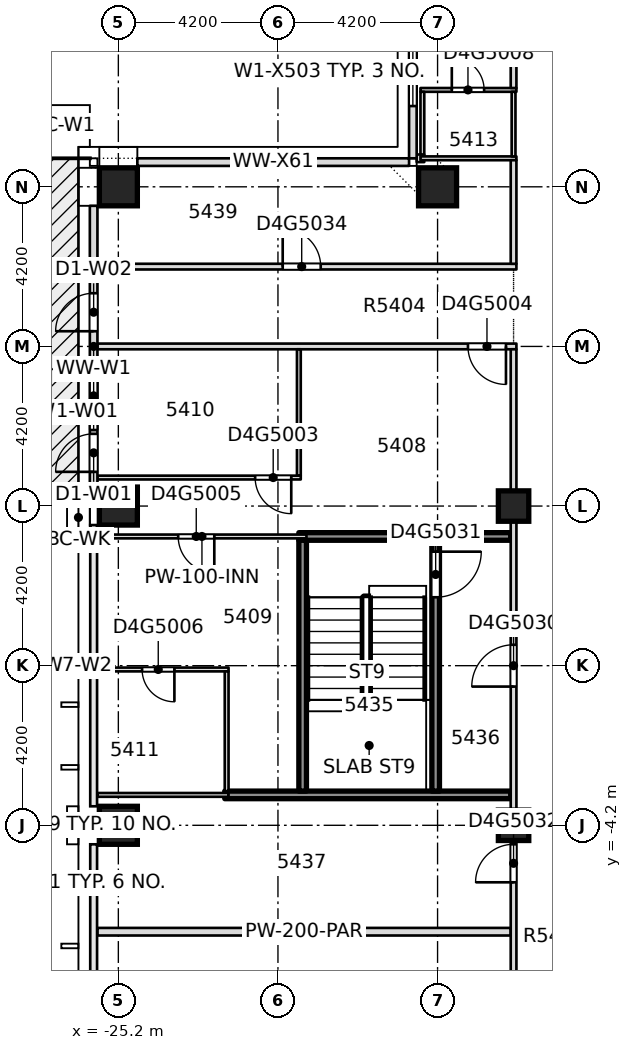
"""IFC4 building model, lengths in metres.
Left out: names, types, materials, properties, quantities, classifications, styles, units other than length and angle.
Written with IfcOpenShell. Run it as: python <this file> out.ifc"""

import sys

from ifc_helpers import new_model, si_unit, direction, frame, frame_2d, origin, origin_2d, place, context, subcontext, project, spatial, rectangle, extrude, element, fill, save


model = new_model("IFC4")
c1 = context("Model", 3, precision=1e-05, world=origin(), true_north=direction((0.0, 1.0)))
c2 = subcontext(c1, "Body", "Model", "MODEL_VIEW")
j1 = project(units=[si_unit("LENGTHUNIT", "METRE"), si_unit("PLANEANGLEUNIT", "RADIAN")], contexts=[c1])
p1 = place(None, origin())
s1 = spatial("IfcSite", under=j1, at=p1, CompositionType="ELEMENT")
p2 = place(p1, origin())
s2 = spatial("IfcBuilding", under=s1, at=p2, CompositionType="ELEMENT")
p3 = place(p2, frame((0.0, 0.0, 206.6)))
s3 = spatial("IfcBuildingStorey", under=s2, at=p3, CompositionType="ELEMENT", Elevation=206.6)
for number, where, z_axis, x_axis in (
    (1, (-25.2, -4.2, -0.4), (0.0, 0.0, 1.0), (1.0, 0.0, 0.0)),
    (2, (-25.2, 4.2, -0.4), (0.0, 0.0, 1.0), (1.0, 0.0, 0.0)),
    (3, (-25.2, 12.6, -0.4), (0.0, 0.0, 1.0), (1.0, 0.0, 0.0)),
    (4, (-16.8, 12.6, -0.4), (0.0, 0.0, 1.0), (1.0, 0.0, 0.0)),
):
    element("IfcColumn", number, at=place(p3, frame(where, z_axis=z_axis, x_axis=x_axis)), inside=s3, PredefinedType="COLUMN", context=c2, shape_type="SweptSolid", body=[
        extrude(rectangle(XDim=1.0, YDim=1.0, at=origin_2d()), origin(), (0.0, 0.0, 1.0), 3.45),
    ])
for number, where, z_axis, x_axis in (
    (5, (-14.8, -4.2, -0.4), (0.0, 0.0, 1.0), (1.0, 0.0, 0.0)),
    (6, (-14.8, 4.2, -0.4), (0.0, 0.0, 1.0), (1.0, 0.0, 0.0)),
):
    element("IfcColumn", number, at=place(p3, frame(where, z_axis=z_axis, x_axis=x_axis)), inside=s3, PredefinedType="COLUMN", context=c2, shape_type="SweptSolid", body=[
        extrude(rectangle(XDim=0.8, YDim=0.8, at=origin_2d()), origin(), (0.0, 0.0, 1.0), 3.45),
    ])
p4 = place(p3, frame((-25.75, -7.0, 0.0), z_axis=(0.0, 0.0, 1.0), x_axis=(1.0, 0.0, 0.0)))
e7 = element("IfcWall", 7, at=p4, inside=s3, PredefinedType="PARTITIONING", context=c2, shape_type="SweptSolid", body=[
    extrude(rectangle(XDim=10.875, YDim=0.2, at=frame_2d((5.438, 0.0))), origin(), (0.0, 0.0, 1.0), 3.05),
])
p5 = place(p3, frame((-25.75, -3.4, 0.0), z_axis=(0.0, 0.0, 1.0), x_axis=(1.0, 0.0, 0.0)))
e8 = element("IfcWall", 8, at=p5, inside=s3, PredefinedType="PARTITIONING", context=c2, shape_type="SweptSolid", body=[
    extrude(rectangle(XDim=3.45, YDim=0.1, at=frame_2d((1.725, 0.0))), origin(), (0.0, 0.0, 1.0), 3.05),
])
p6 = place(p3, frame((-22.4, -3.4, 0.0), z_axis=(0.0, 0.0, 1.0), x_axis=(1.0, 0.0, 0.0)))
e9 = element("IfcWall", 9, at=p6, inside=s3, PredefinedType="SOLIDWALL", context=c2, shape_type="SweptSolid", body=[
    extrude(rectangle(XDim=7.525, YDim=0.2, at=frame_2d((3.762, 0.0))), origin(), (0.0, 0.0, 1.0), 3.05),
])
p7 = place(p3, frame((-25.75, -0.1, 0.0), z_axis=(0.0, 0.0, 1.0), x_axis=(1.0, 0.0, 0.0)))
e10 = element("IfcWall", 10, at=p7, inside=s3, PredefinedType="PARTITIONING", context=c2, shape_type="SweptSolid", body=[
    extrude(rectangle(XDim=3.45, YDim=0.1, at=frame_2d((1.725, 0.0))), origin(), (0.0, 0.0, 1.0), 3.05),
])
p8 = place(p7, frame((1.175, 0.0, 0.0)))
e11 = element("IfcOpeningElement", 11, at=p8, cuts=e10, PredefinedType="OPENING", context=c2, shape_type="SweptSolid", body=[
    extrude(rectangle(XDim=0.85, YDim=2.1, at=frame_2d((0.425, 1.05))), frame((0.0, 0.06, 0.0), z_axis=(0.0, -1.0, 0.0), x_axis=(1.0, 0.0, 0.0)), (0.0, 0.0, 1.0), 0.12),
])
p9 = place(p3, frame((-25.75, 3.4, 0.0), z_axis=(0.0, 0.0, 1.0), x_axis=(1.0, 0.0, 0.0)))
e12 = element("IfcWall", 12, at=p9, inside=s3, PredefinedType="PARTITIONING", context=c2, shape_type="SweptSolid", body=[
    extrude(rectangle(XDim=5.5, YDim=0.1, at=frame_2d((2.75, 0.0))), origin(), (0.0, 0.0, 1.0), 3.05),
])
p10 = place(p9, frame((2.125, 0.0, 0.0)))
e13 = element("IfcOpeningElement", 13, at=p10, cuts=e12, PredefinedType="OPENING", context=c2, shape_type="SweptSolid", body=[
    extrude(rectangle(XDim=0.95, YDim=2.1, at=frame_2d((0.475, 1.05))), frame((0.0, 0.06, 0.0), z_axis=(0.0, -1.0, 0.0), x_axis=(1.0, 0.0, 0.0)), (0.0, 0.0, 1.0), 0.12),
])
p11 = place(p3, frame((-20.45, 3.4, 0.0), z_axis=(0.0, 0.0, 1.0), x_axis=(1.0, 0.0, 0.0)))
e14 = element("IfcWall", 14, at=p11, inside=s3, PredefinedType="SOLIDWALL", context=c2, shape_type="SweptSolid", body=[
    extrude(rectangle(XDim=5.575, YDim=0.2, at=frame_2d((2.788, 0.0))), origin(), (0.0, 0.0, 1.0), 3.05),
])
p12 = place(p3, frame((-25.75, 4.95, 0.0), z_axis=(0.0, 0.0, 1.0), x_axis=(1.0, 0.0, 0.0)))
e15 = element("IfcWall", 15, at=p12, inside=s3, PredefinedType="PARTITIONING", context=c2, shape_type="SweptSolid", body=[
    extrude(rectangle(XDim=5.35, YDim=0.1, at=frame_2d((2.675, 0.0))), origin(), (0.0, 0.0, 1.0), 3.05),
])
p13 = place(p12, frame((4.15, 0.0, 0.0)))
e16 = element("IfcOpeningElement", 16, at=p13, cuts=e15, PredefinedType="OPENING", context=c2, shape_type="SweptSolid", body=[
    extrude(rectangle(XDim=0.95, YDim=2.1, at=frame_2d((0.475, 1.05))), frame((0.0, 0.06, 0.0), z_axis=(0.0, -1.0, 0.0), x_axis=(1.0, 0.0, 0.0)), (0.0, 0.0, 1.0), 0.12),
])
p14 = place(p3, frame((-25.75, 8.4, 0.0), z_axis=(0.0, 0.0, 1.0), x_axis=(1.0, 0.0, 0.0)))
e17 = element("IfcWall", 17, at=p14, inside=s3, PredefinedType="PARTITIONING", context=c2, shape_type="SweptSolid", body=[
    extrude(rectangle(XDim=11.025, YDim=0.15, at=frame_2d((5.512, 0.0))), origin(), (0.0, 0.0, 1.0), 3.05),
])
p15 = place(p14, frame((9.75, 0.0, 0.0)))
e18 = element("IfcOpeningElement", 18, at=p15, cuts=e17, PredefinedType="OPENING", context=c2, shape_type="SweptSolid", body=[
    extrude(rectangle(XDim=1.0, YDim=2.1, at=frame_2d((0.5, 1.05))), frame((0.0, 0.085, 0.0), z_axis=(0.0, -1.0, 0.0), x_axis=(1.0, 0.0, 0.0)), (0.0, 0.0, 1.0), 0.17),
])
p16 = place(p3, frame((-25.75, 10.5, 0.0), z_axis=(0.0, 0.0, 1.0), x_axis=(1.0, 0.0, 0.0)))
e19 = element("IfcWall", 19, at=p16, inside=s3, PredefinedType="PARTITIONING", context=c2, shape_type="SweptSolid", body=[
    extrude(rectangle(XDim=11.025, YDim=0.15, at=frame_2d((5.512, 0.0))), origin(), (0.0, 0.0, 1.0), 3.05),
])
p17 = place(p16, frame((4.875, 0.0, 0.0)))
e20 = element("IfcOpeningElement", 20, at=p17, cuts=e19, PredefinedType="OPENING", context=c2, shape_type="SweptSolid", body=[
    extrude(rectangle(XDim=1.0, YDim=2.1, at=frame_2d((0.5, 1.05))), frame((0.0, 0.085, 0.0), z_axis=(0.0, -1.0, 0.0), x_axis=(1.0, 0.0, 0.0)), (0.0, 0.0, 1.0), 0.17),
])
p18 = place(p3, frame((-17.35, 13.35, 0.0), z_axis=(0.0, 0.0, 1.0), x_axis=(1.0, 0.0, 0.0)))
e21 = element("IfcWall", 21, at=p18, inside=s3, PredefinedType="PARTITIONING", context=c2, shape_type="SweptSolid", body=[
    extrude(rectangle(XDim=0.2, YDim=0.2, at=frame_2d((0.1, 0.0))), origin(), (0.0, 0.0, 1.0), 3.05),
])
p19 = place(p3, frame((-17.25, 13.35, 0.0), z_axis=(0.0, 0.0, 1.0), x_axis=(1.0, 0.0, 0.0)))
e22 = element("IfcWall", 22, at=p19, inside=s3, PredefinedType="PARTITIONING", context=c2, shape_type="SweptSolid", body=[
    extrude(rectangle(XDim=2.525, YDim=0.1, at=frame_2d((1.262, 0.0))), origin(), (0.0, 0.0, 1.0), 3.05),
])
p20 = place(p3, frame((-17.25, 15.15, 0.0), z_axis=(0.0, 0.0, 1.0), x_axis=(1.0, 0.0, 0.0)))
e23 = element("IfcWall", 23, at=p20, inside=s3, PredefinedType="PARTITIONING", context=c2, shape_type="SweptSolid", body=[
    extrude(rectangle(XDim=2.525, YDim=0.1, at=frame_2d((1.262, 0.0))), origin(), (0.0, 0.0, 1.0), 3.05),
])
p21 = place(p20, frame((0.825, 0.0, 0.0)))
e24 = element("IfcOpeningElement", 24, at=p21, cuts=e23, PredefinedType="OPENING", context=c2, shape_type="SweptSolid", body=[
    extrude(rectangle(XDim=0.85, YDim=2.1, at=frame_2d((0.425, 1.05))), frame((0.0, 0.06, 0.0), z_axis=(0.0, -1.0, 0.0), x_axis=(1.0, 0.0, 0.0)), (0.0, 0.0, 1.0), 0.12),
])
p22 = place(p3, frame((-22.35, -3.3, 0.0), z_axis=(0.0, 0.0, 1.0), x_axis=(0.0, 1.0, 0.0)))
e25 = element("IfcWall", 25, at=p22, inside=s3, PredefinedType="PARTITIONING", context=c2, shape_type="SweptSolid", body=[
    extrude(rectangle(XDim=3.15, YDim=0.1, at=frame_2d((1.575, 0.0))), origin(), (0.0, 0.0, 1.0), 3.05),
])
p23 = place(p3, frame((-20.45, 5.0, 0.0), z_axis=(0.0, 0.0, 1.0), x_axis=(0.0, 1.0, 0.0)))
e26 = element("IfcWall", 26, at=p23, inside=s3, PredefinedType="PARTITIONING", context=c2, shape_type="SweptSolid", body=[
    extrude(rectangle(XDim=3.325, YDim=0.1, at=frame_2d((1.663, 0.0))), origin(), (0.0, 0.0, 1.0), 3.05),
])
p24 = place(p3, frame((-20.35, -3.3, 0.0), z_axis=(0.0, 0.0, 1.0), x_axis=(0.0, 1.0, 0.0)))
e27 = element("IfcWall", 27, at=p24, inside=s3, PredefinedType="SOLIDWALL", context=c2, shape_type="SweptSolid", body=[
    extrude(rectangle(XDim=6.6, YDim=0.2, at=frame_2d((3.3, 0.0))), origin(), (0.0, 0.0, 1.0), 3.05),
])
p25 = place(p3, frame((-17.2, 13.45, 0.0), z_axis=(0.0, 0.0, 1.0), x_axis=(0.0, 1.0, 0.0)))
e28 = element("IfcWall", 28, at=p25, inside=s3, PredefinedType="PARTITIONING", context=c2, shape_type="SweptSolid", body=[
    extrude(rectangle(XDim=1.65, YDim=0.1, at=frame_2d((0.825, 0.0))), origin(), (0.0, 0.0, 1.0), 3.05),
])
p26 = place(p3, frame((-16.85, -3.3, 0.0), z_axis=(0.0, 0.0, 1.0), x_axis=(0.0, 1.0, 0.0)))
e29 = element("IfcWall", 29, at=p26, inside=s3, PredefinedType="SOLIDWALL", context=c2, shape_type="SweptSolid", body=[
    extrude(rectangle(XDim=6.6, YDim=0.2, at=frame_2d((3.3, 0.0))), origin(), (0.0, 0.0, 1.0), 3.05),
])
p27 = place(p26, frame((5.1, 0.0, 0.0)))
e30 = element("IfcOpeningElement", 30, at=p27, cuts=e29, PredefinedType="OPENING", context=c2, shape_type="SweptSolid", body=[
    extrude(rectangle(XDim=1.2, YDim=2.1, at=frame_2d((0.6, 1.05))), frame((0.0, 0.11, 0.0), z_axis=(0.0, -1.0, 0.0), x_axis=(1.0, 0.0, 0.0)), (0.0, 0.0, 1.0), 0.22),
])
p28 = place(p3, frame((-14.8, -9.77, 0.0), z_axis=(0.0, 0.0, 1.0), x_axis=(0.0, 1.0, 0.0)))
e31 = element("IfcWall", 31, at=p28, inside=s3, PredefinedType="PARTITIONING", context=c2, shape_type="SweptSolid", body=[
    extrude(rectangle(XDim=18.095, YDim=0.15, at=frame_2d((9.047, 0.0))), origin(), (0.0, 0.0, 1.0), 3.05),
])
p29 = place(p28, frame((0.22, 0.0, 0.0)))
e32 = element("IfcOpeningElement", 32, at=p29, cuts=e31, PredefinedType="OPENING", context=c2, shape_type="SweptSolid", body=[
    extrude(rectangle(XDim=0.95, YDim=2.1, at=frame_2d((0.475, 1.05))), frame((0.0, 0.085, 0.0), z_axis=(0.0, -1.0, 0.0), x_axis=(1.0, 0.0, 0.0)), (0.0, 0.0, 1.0), 0.17),
])
p30 = place(p28, frame((9.22, 0.0, 0.0)))
e33 = element("IfcOpeningElement", 33, at=p30, cuts=e31, PredefinedType="OPENING", context=c2, shape_type="SweptSolid", body=[
    extrude(rectangle(XDim=1.1, YDim=2.1, at=frame_2d((0.55, 1.05))), frame((0.0, 0.085, 0.0), z_axis=(0.0, -1.0, 0.0), x_axis=(1.0, 0.0, 0.0)), (0.0, 0.0, 1.0), 0.17),
])
p31 = place(p28, frame((4.07, 0.0, 0.0)))
e34 = element("IfcOpeningElement", 34, at=p31, cuts=e31, PredefinedType="OPENING", context=c2, shape_type="SweptSolid", body=[
    extrude(rectangle(XDim=1.0, YDim=2.1, at=frame_2d((0.5, 1.05))), frame((0.0, 0.085, 0.0), z_axis=(0.0, -1.0, 0.0), x_axis=(1.0, 0.0, 0.0)), (0.0, 0.0, 1.0), 0.17),
])
p32 = place(p3, frame((-14.8, 10.575, 0.0), z_axis=(0.0, 0.0, 1.0), x_axis=(0.0, 1.0, 0.0)))
e35 = element("IfcWall", 35, at=p32, inside=s3, PredefinedType="PARTITIONING", context=c2, shape_type="SweptSolid", body=[
    extrude(rectangle(XDim=2.725, YDim=0.15, at=frame_2d((1.363, 0.0))), origin(), (0.0, 0.0, 1.0), 3.05),
])
p33 = place(p3, frame((-14.8, 13.4, 0.0), z_axis=(0.0, 0.0, 1.0), x_axis=(0.0, 1.0, 0.0)))
e36 = element("IfcWall", 36, at=p33, inside=s3, PredefinedType="PARTITIONING", context=c2, shape_type="SweptSolid", body=[
    extrude(rectangle(XDim=1.7, YDim=0.1, at=frame_2d((0.85, 0.0))), origin(), (0.0, 0.0, 1.0), 3.05),
])
p34 = place(p3, frame((-14.8, 15.2, 0.0), z_axis=(0.0, 0.0, 1.0), x_axis=(0.0, 1.0, 0.0)))
e37 = element("IfcWall", 37, at=p34, inside=s3, PredefinedType="PARTITIONING", context=c2, shape_type="SweptSolid", body=[
    extrude(rectangle(XDim=6.35, YDim=0.15, at=frame_2d((3.175, 0.0))), origin(), (0.0, 0.0, 1.0), 3.05),
])
p35 = place(p34, frame((2.475, 0.0, 0.0)))
e38 = element("IfcOpeningElement", 38, at=p35, cuts=e37, PredefinedType="OPENING", context=c2, shape_type="SweptSolid", body=[
    extrude(rectangle(XDim=0.95, YDim=2.1, at=frame_2d((0.475, 1.05))), frame((0.0, 0.085, 0.0), z_axis=(0.0, -1.0, 0.0), x_axis=(1.0, 0.0, 0.0)), (0.0, 0.0, 1.0), 0.17),
])
p36 = place(p3, frame((-17.45, 20.5, 0.0), z_axis=(0.0, 0.0, 1.0), x_axis=(0.0, -1.0, 0.0)))
e39 = element("IfcWall", 39, at=p36, inside=s3, PredefinedType="STANDARD", context=c2, shape_type="SweptSolid", body=[
    extrude(rectangle(XDim=7.15, YDim=0.2, at=frame_2d((3.575, 0.0))), origin(), (0.0, 0.0, 1.0), 3.05),
])
p37 = place(p36, frame((3.975, 0.0, 0.2)))
e40 = element("IfcOpeningElement", 40, at=p37, cuts=e39, PredefinedType="OPENING", context=c2, shape_type="SweptSolid", body=[
    extrude(rectangle(XDim=1.8, YDim=2.65, at=frame_2d((0.9, 1.325))), frame((0.0, 0.11, 0.0), z_axis=(0.0, -1.0, 0.0), x_axis=(1.0, 0.0, 0.0)), (0.0, 0.0, 1.0), 0.22),
])
p38 = place(p36, frame((0.4, 0.0, 0.2)))
e41 = element("IfcOpeningElement", 41, at=p38, cuts=e39, PredefinedType="OPENING", context=c2, shape_type="SweptSolid", body=[
    extrude(rectangle(XDim=1.8, YDim=2.65, at=frame_2d((0.9, 1.325))), frame((0.0, 0.11, 0.0), z_axis=(0.0, -1.0, 0.0), x_axis=(1.0, 0.0, 0.0)), (0.0, 0.0, 1.0), 0.22),
])
p39 = place(p3, frame((-17.55, 13.25, 0.0), z_axis=(0.0, 0.0, 1.0), x_axis=(-1.0, 0.0, 0.0)))
e42 = element("IfcWall", 42, at=p39, inside=s3, PredefinedType="STANDARD", context=c2, shape_type="SweptSolid", body=[
    extrude(rectangle(XDim=7.15, YDim=0.2, at=frame_2d((3.575, 0.0))), origin(), (0.0, 0.0, 1.0), 3.05),
])
p40 = place(p3, frame((-25.85, 12.1, 0.0), z_axis=(0.0, 0.0, 1.0), x_axis=(0.0, -1.0, 0.0)))
e43 = element("IfcWall", 43, at=p40, inside=s3, PredefinedType="STANDARD", context=c2, shape_type="SweptSolid", body=[
    extrude(rectangle(XDim=7.4, YDim=0.2, at=frame_2d((3.7, 0.0))), origin(), (0.0, 0.0, 1.0), 3.05),
])
p41 = place(p40, frame((4.1, 0.0, 0.2)))
e44 = element("IfcOpeningElement", 44, at=p41, cuts=e43, PredefinedType="OPENING", context=c2, shape_type="SweptSolid", body=[
    extrude(rectangle(XDim=1.8, YDim=2.65, at=frame_2d((0.9, 1.325))), frame((0.0, 0.11, 0.0), z_axis=(0.0, -1.0, 0.0), x_axis=(1.0, 0.0, 0.0)), (0.0, 0.0, 1.0), 0.22),
])
p42 = place(p40, frame((6.0, 0.0, 0.0)))
e45 = element("IfcOpeningElement", 45, at=p42, cuts=e43, PredefinedType="OPENING", context=c2, shape_type="SweptSolid", body=[
    extrude(rectangle(XDim=1.0, YDim=2.4, at=frame_2d((0.5, 1.2))), frame((0.0, 0.11, 0.0), z_axis=(0.0, -1.0, 0.0), x_axis=(1.0, 0.0, 0.0)), (0.0, 0.0, 1.0), 0.22),
])
p43 = place(p40, frame((2.3, 0.0, 0.0)))
e46 = element("IfcOpeningElement", 46, at=p43, cuts=e43, PredefinedType="OPENING", context=c2, shape_type="SweptSolid", body=[
    extrude(rectangle(XDim=1.0, YDim=2.4, at=frame_2d((0.5, 1.2))), frame((0.0, 0.11, 0.0), z_axis=(0.0, -1.0, 0.0), x_axis=(1.0, 0.0, 0.0)), (0.0, 0.0, 1.0), 0.22),
])
p44 = place(p13, origin())
e47 = element("IfcDoor", 47, at=p44, inside=s3, OperationType="SINGLE_SWING_LEFT", PredefinedType="DOOR", context=c2, shape_type="SweptSolid", body=[
    extrude(rectangle(XDim=0.95, YDim=2.1, at=frame_2d((0.475, 1.05))), frame((0.0, 0.025, 0.0), z_axis=(0.0, -1.0, 0.0), x_axis=(1.0, 0.0, 0.0)), (0.0, 0.0, 1.0), 0.05),
])
fill(e16, e47)
p45 = place(p15, origin())
e48 = element("IfcDoor", 48, at=p45, inside=s3, OperationType="SINGLE_SWING_RIGHT", PredefinedType="DOOR", context=c2, shape_type="SweptSolid", body=[
    extrude(rectangle(XDim=1.0, YDim=2.1, at=frame_2d((0.5, 1.05))), frame((0.0, 0.025, 0.0), z_axis=(0.0, -1.0, 0.0), x_axis=(1.0, 0.0, 0.0)), (0.0, 0.0, 1.0), 0.05),
])
fill(e18, e48)
p46 = place(p10, origin())
e49 = element("IfcDoor", 49, at=p46, inside=s3, OperationType="SINGLE_SWING_LEFT", PredefinedType="DOOR", context=c2, shape_type="SweptSolid", body=[
    extrude(rectangle(XDim=0.95, YDim=2.1, at=frame_2d((0.475, 1.05))), frame((0.0, 0.025, 0.0), z_axis=(0.0, -1.0, 0.0), x_axis=(1.0, 0.0, 0.0)), (0.0, 0.0, 1.0), 0.05),
])
fill(e13, e49)
p47 = place(p8, origin())
e50 = element("IfcDoor", 50, at=p47, inside=s3, OperationType="SINGLE_SWING_RIGHT", PredefinedType="DOOR", context=c2, shape_type="SweptSolid", body=[
    extrude(rectangle(XDim=0.85, YDim=2.1, at=frame_2d((0.425, 1.05))), frame((0.0, 0.025, 0.0), z_axis=(0.0, -1.0, 0.0), x_axis=(1.0, 0.0, 0.0)), (0.0, 0.0, 1.0), 0.05),
])
fill(e11, e50)
p48 = place(p21, origin())
e51 = element("IfcDoor", 51, at=p48, inside=s3, OperationType="SINGLE_SWING_RIGHT", PredefinedType="DOOR", context=c2, shape_type="SweptSolid", body=[
    extrude(rectangle(XDim=0.85, YDim=2.1, at=frame_2d((0.425, 1.05))), frame((0.0, 0.025, 0.0), z_axis=(0.0, -1.0, 0.0), x_axis=(1.0, 0.0, 0.0)), (0.0, 0.0, 1.0), 0.05),
])
fill(e24, e51)
p49 = place(p30, origin())
e52 = element("IfcDoor", 52, at=p49, inside=s3, OperationType="SINGLE_SWING_RIGHT", PredefinedType="DOOR", context=c2, shape_type="SweptSolid", body=[
    extrude(rectangle(XDim=1.1, YDim=2.1, at=frame_2d((0.55, 1.05))), frame((0.0, 0.025, 0.0), z_axis=(0.0, -1.0, 0.0), x_axis=(1.0, 0.0, 0.0)), (0.0, 0.0, 1.0), 0.05),
])
fill(e33, e52)
p50 = place(p27, origin())
e53 = element("IfcDoor", 53, at=p50, inside=s3, OperationType="SINGLE_SWING_RIGHT", PredefinedType="DOOR", context=c2, shape_type="SweptSolid", body=[
    extrude(rectangle(XDim=1.2, YDim=2.1, at=frame_2d((0.6, 1.05))), frame((0.0, 0.025, 0.0), z_axis=(0.0, -1.0, 0.0), x_axis=(1.0, 0.0, 0.0)), (0.0, 0.0, 1.0), 0.05),
])
fill(e30, e53)
p51 = place(p31, origin())
e54 = element("IfcDoor", 54, at=p51, inside=s3, OperationType="SINGLE_SWING_LEFT", PredefinedType="DOOR", context=c2, shape_type="SweptSolid", body=[
    extrude(rectangle(XDim=1.0, YDim=2.1, at=frame_2d((0.5, 1.05))), frame((0.0, 0.025, 0.0), z_axis=(0.0, -1.0, 0.0), x_axis=(1.0, 0.0, 0.0)), (0.0, 0.0, 1.0), 0.05),
])
fill(e34, e54)
p52 = place(p17, origin())
e55 = element("IfcDoor", 55, at=p52, inside=s3, OperationType="SINGLE_SWING_RIGHT", PredefinedType="DOOR", context=c2, shape_type="SweptSolid", body=[
    extrude(rectangle(XDim=1.0, YDim=2.1, at=frame_2d((0.5, 1.05))), frame((0.0, 0.025, 0.0), z_axis=(0.0, -1.0, 0.0), x_axis=(1.0, 0.0, 0.0)), (0.0, 0.0, 1.0), 0.05),
])
fill(e20, e55)
p53 = place(p37, origin())
e56 = element("IfcWindow", 56, at=p53, inside=s3, PartitioningType="SINGLE_PANEL", PredefinedType="WINDOW", context=c2, shape_type="SweptSolid", body=[
    extrude(rectangle(XDim=1.8, YDim=2.65, at=frame_2d((0.9, 1.325))), frame((0.0, 0.03, 0.0), z_axis=(0.0, -1.0, 0.0), x_axis=(1.0, 0.0, 0.0)), (0.0, 0.0, 1.0), 0.06),
])
fill(e40, e56)
p54 = place(p41, origin())
e57 = element("IfcWindow", 57, at=p54, inside=s3, PartitioningType="SINGLE_PANEL", PredefinedType="WINDOW", context=c2, shape_type="SweptSolid", body=[
    extrude(rectangle(XDim=1.8, YDim=2.65, at=frame_2d((0.9, 1.325))), frame((0.0, 0.03, 0.0), z_axis=(0.0, -1.0, 0.0), x_axis=(1.0, 0.0, 0.0)), (0.0, 0.0, 1.0), 0.06),
])
fill(e44, e57)
p55 = place(p42, origin())
e58 = element("IfcDoor", 58, at=p55, inside=s3, OperationType="SINGLE_SWING_LEFT", PredefinedType="DOOR", context=c2, shape_type="SweptSolid", body=[
    extrude(rectangle(XDim=1.0, YDim=2.4, at=frame_2d((0.5, 1.2))), frame((0.0, 0.025, 0.0), z_axis=(0.0, -1.0, 0.0), x_axis=(1.0, 0.0, 0.0)), (0.0, 0.0, 1.0), 0.05),
])
fill(e45, e58)
p56 = place(p43, origin())
e59 = element("IfcDoor", 59, at=p56, inside=s3, OperationType="SINGLE_SWING_LEFT", PredefinedType="DOOR", context=c2, shape_type="SweptSolid", body=[
    extrude(rectangle(XDim=1.0, YDim=2.4, at=frame_2d((0.5, 1.2))), frame((0.0, 0.025, 0.0), z_axis=(0.0, -1.0, 0.0), x_axis=(1.0, 0.0, 0.0)), (0.0, 0.0, 1.0), 0.05),
])
fill(e46, e59)
save(model, sys.argv[1])
